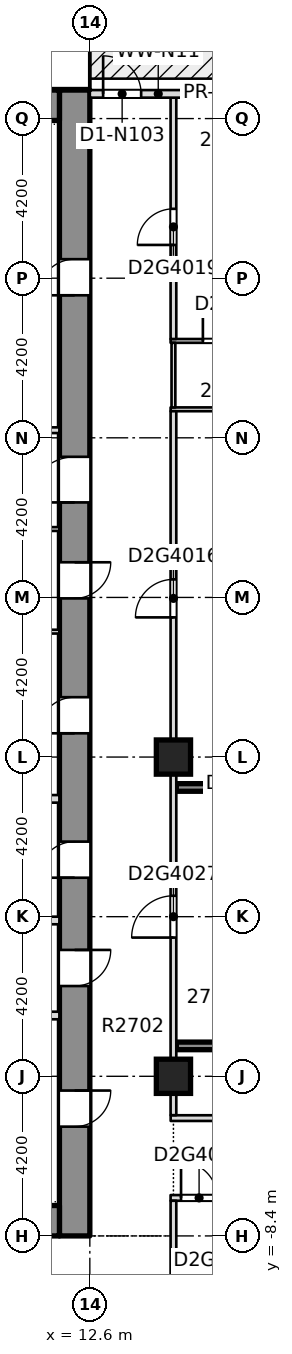
"""IFC4 building model, lengths in metres.
Left out: names, types, materials, properties, quantities, classifications, styles, units other than length and angle.
Written with IfcOpenShell. Run it as: python <this file> out.ifc"""

import sys

from ifc_helpers import new_model, si_unit, direction, frame, frame_2d, origin, origin_2d, place, context, subcontext, project, spatial, rectangle, extrude, element, fill, save


model = new_model("IFC4")
c1 = context("Model", 3, precision=1e-05, world=origin(), true_north=direction((0.0, 1.0)))
c2 = subcontext(c1, "Body", "Model", "MODEL_VIEW")
j1 = project(units=[si_unit("LENGTHUNIT", "METRE"), si_unit("PLANEANGLEUNIT", "RADIAN")], contexts=[c1])
p1 = place(None, origin())
s1 = spatial("IfcSite", under=j1, at=p1, CompositionType="ELEMENT")
p2 = place(p1, origin())
s2 = spatial("IfcBuilding", under=s1, at=p2, CompositionType="ELEMENT")
p3 = place(p2, frame((0.0, 0.0, 108.0)))
s3 = spatial("IfcBuildingStorey", under=s2, at=p3, CompositionType="ELEMENT", Elevation=108.0)
p4 = place(p3, frame((12.2, -8.4, -0.32), z_axis=(0.0, 0.0, 1.0), x_axis=(0.0, 1.0, 0.0)))
e1 = element("IfcWall", 1, at=p4, inside=s3, PredefinedType="SHEAR", context=c2, shape_type="SweptSolid", body=[
    extrude(rectangle(XDim=30.15, YDim=0.8, at=frame_2d((15.075, 0.0))), origin(), (0.0, 0.0, 1.0), 3.45),
])
p5 = place(p4, frame((2.875, 0.0, 0.32)))
e2 = element("IfcOpeningElement", 2, at=p5, cuts=e1, PredefinedType="OPENING", context=c2, shape_type="SweptSolid", body=[
    extrude(rectangle(XDim=0.95, YDim=2.1, at=frame_2d((0.475, 1.05))), frame((0.0, 0.41, 0.0), z_axis=(0.0, -1.0, 0.0), x_axis=(1.0, 0.0, 0.0)), (0.0, 0.0, 1.0), 0.82),
])
p6 = place(p4, frame((6.575, 0.0, 0.32)))
e3 = element("IfcOpeningElement", 3, at=p6, cuts=e1, PredefinedType="OPENING", context=c2, shape_type="SweptSolid", body=[
    extrude(rectangle(XDim=0.95, YDim=2.1, at=frame_2d((0.475, 1.05))), frame((0.0, 0.41, 0.0), z_axis=(0.0, -1.0, 0.0), x_axis=(1.0, 0.0, 0.0)), (0.0, 0.0, 1.0), 0.82),
])
p7 = place(p4, frame((9.425, 0.0, 0.32)))
e4 = element("IfcOpeningElement", 4, at=p7, cuts=e1, PredefinedType="OPENING", context=c2, shape_type="SweptSolid", body=[
    extrude(rectangle(XDim=0.95, YDim=2.1, at=frame_2d((0.475, 1.05))), frame((0.0, 0.41, 0.0), z_axis=(0.0, -1.0, 0.0), x_axis=(1.0, 0.0, 0.0)), (0.0, 0.0, 1.0), 0.82),
])
p8 = place(p4, frame((13.225, 0.0, 0.32)))
e5 = element("IfcOpeningElement", 5, at=p8, cuts=e1, PredefinedType="OPENING", context=c2, shape_type="SweptSolid", body=[
    extrude(rectangle(XDim=0.95, YDim=2.1, at=frame_2d((0.475, 1.05))), frame((0.0, 0.41, 0.0), z_axis=(0.0, -1.0, 0.0), x_axis=(1.0, 0.0, 0.0)), (0.0, 0.0, 1.0), 0.82),
])
p9 = place(p4, frame((16.775, 0.0, 0.32)))
e6 = element("IfcOpeningElement", 6, at=p9, cuts=e1, PredefinedType="OPENING", context=c2, shape_type="SweptSolid", body=[
    extrude(rectangle(XDim=0.95, YDim=2.1, at=frame_2d((0.475, 1.05))), frame((0.0, 0.41, 0.0), z_axis=(0.0, -1.0, 0.0), x_axis=(1.0, 0.0, 0.0)), (0.0, 0.0, 1.0), 0.82),
])
p10 = place(p4, frame((24.75, 0.0, 0.32)))
e7 = element("IfcOpeningElement", 7, at=p10, cuts=e1, PredefinedType="OPENING", context=c2, shape_type="SweptSolid", body=[
    extrude(rectangle(XDim=0.95, YDim=2.1, at=frame_2d((0.475, 1.05))), frame((0.0, 0.41, 0.0), z_axis=(0.0, -1.0, 0.0), x_axis=(1.0, 0.0, 0.0)), (0.0, 0.0, 1.0), 0.82),
])
p11 = place(p4, frame((19.3, 0.0, 0.32)))
e8 = element("IfcOpeningElement", 8, at=p11, cuts=e1, PredefinedType="OPENING", context=c2, shape_type="SweptSolid", body=[
    extrude(rectangle(XDim=1.2, YDim=2.1, at=frame_2d((0.6, 1.05))), frame((0.0, 0.41, 0.0), z_axis=(0.0, -1.0, 0.0), x_axis=(1.0, 0.0, 0.0)), (0.0, 0.0, 1.0), 0.82),
])
p12 = place(p3, frame((-11.8, -8.0, -0.32), z_axis=(0.0, 0.0, 1.0), x_axis=(1.0, 0.0, 0.0)))
e9 = element("IfcWall", 9, at=p12, inside=s3, PredefinedType="SHEAR", context=c2, shape_type="SweptSolid", body=[
    extrude(rectangle(XDim=23.6, YDim=0.8, at=frame_2d((11.8, 0.0))), origin(), (0.0, 0.0, 1.0), 3.45),
])
p13 = place(p12, frame((7.05, 0.0, 0.32)))
e10 = element("IfcOpeningElement", 10, at=p13, cuts=e9, PredefinedType="OPENING", context=c2, shape_type="SweptSolid", body=[
    extrude(rectangle(XDim=1.8, YDim=2.1, at=frame_2d((0.9, 1.05))), frame((0.0, 0.41, 0.0), z_axis=(0.0, -1.0, 0.0), x_axis=(1.0, 0.0, 0.0)), (0.0, 0.0, 1.0), 0.82),
])
p14 = place(p12, frame((14.75, 0.0, 0.32)))
e11 = element("IfcOpeningElement", 11, at=p14, cuts=e9, PredefinedType="OPENING", context=c2, shape_type="SweptSolid", body=[
    extrude(rectangle(XDim=1.8, YDim=2.1, at=frame_2d((0.9, 1.05))), frame((0.0, 0.41, 0.0), z_axis=(0.0, -1.0, 0.0), x_axis=(1.0, 0.0, 0.0)), (0.0, 0.0, 1.0), 0.82),
])
p15 = place(p3, frame((-11.8, 21.35, -0.32), z_axis=(0.0, 0.0, 1.0), x_axis=(1.0, 0.0, 0.0)))
e12 = element("IfcWall", 12, at=p15, inside=s3, PredefinedType="SHEAR", context=c2, shape_type="SweptSolid", body=[
    extrude(rectangle(XDim=23.6, YDim=0.8, at=frame_2d((11.8, 0.0))), origin(), (0.0, 0.0, 1.0), 3.45),
])
for number, where, z_axis, x_axis in (
    (13, (14.8, -4.2, -0.32), (0.0, 0.0, 1.0), (1.0, 0.0, 0.0)),
    (14, (14.8, 4.2, -0.32), (0.0, 0.0, 1.0), (1.0, 0.0, 0.0)),
):
    element("IfcColumn", number, at=place(p3, frame(where, z_axis=z_axis, x_axis=x_axis)), inside=s3, PredefinedType="COLUMN", context=c2, shape_type="SweptSolid", body=[
        extrude(rectangle(XDim=0.9, YDim=0.9, at=origin_2d()), origin(), (0.0, 0.0, 1.0), 3.45),
    ])
p16 = place(p3, frame((14.725, -7.4, 0.0), z_axis=(0.0, 0.0, 1.0), x_axis=(1.0, 0.0, 0.0)))
e15 = element("IfcWall", 15, at=p16, inside=s3, PredefinedType="PARTITIONING", context=c2, shape_type="SweptSolid", body=[
    extrude(rectangle(XDim=11.025, YDim=0.15, at=frame_2d((5.512, 0.0))), origin(), (0.0, 0.0, 1.0), 3.13),
])
p17 = place(p16, frame((0.275, 0.0, 0.0)))
e16 = element("IfcOpeningElement", 16, at=p17, cuts=e15, PredefinedType="OPENING", context=c2, shape_type="SweptSolid", body=[
    extrude(rectangle(XDim=0.95, YDim=2.1, at=frame_2d((0.475, 1.05))), frame((0.0, 0.085, 0.0), z_axis=(0.0, -1.0, 0.0), x_axis=(1.0, 0.0, 0.0)), (0.0, 0.0, 1.0), 0.17),
])
p18 = place(p3, frame((14.727, -5.3, 0.0), z_axis=(0.0, 0.0, 1.0), x_axis=(1.0, 0.0, 0.0)))
e17 = element("IfcWall", 17, at=p18, inside=s3, PredefinedType="PARTITIONING", context=c2, shape_type="SweptSolid", body=[
    extrude(rectangle(XDim=11.023, YDim=0.15, at=frame_2d((5.511, 0.0))), origin(), (0.0, 0.0, 1.0), 3.13),
])
p19 = place(p3, frame((14.877, -3.4, 0.0), z_axis=(0.0, 0.0, 1.0), x_axis=(1.0, 0.0, 0.0)))
e18 = element("IfcWall", 18, at=p19, inside=s3, PredefinedType="SOLIDWALL", context=c2, shape_type="SweptSolid", body=[
    extrude(rectangle(XDim=5.523, YDim=0.2, at=frame_2d((2.761, 0.0))), origin(), (0.0, 0.0, 1.0), 3.13),
])
p20 = place(p3, frame((14.875, 3.4, 0.0), z_axis=(0.0, 0.0, 1.0), x_axis=(1.0, 0.0, 0.0)))
e19 = element("IfcWall", 19, at=p20, inside=s3, PredefinedType="SOLIDWALL", context=c2, shape_type="SweptSolid", body=[
    extrude(rectangle(XDim=5.575, YDim=0.2, at=frame_2d((2.788, 0.0))), origin(), (0.0, 0.0, 1.0), 3.13),
])
p21 = place(p3, frame((14.725, 13.35, 0.0), z_axis=(0.0, 0.0, 1.0), x_axis=(1.0, 0.0, 0.0)))
e20 = element("IfcWall", 20, at=p21, inside=s3, PredefinedType="PARTITIONING", context=c2, shape_type="SweptSolid", body=[
    extrude(rectangle(XDim=2.525, YDim=0.1, at=frame_2d((1.262, 0.0))), origin(), (0.0, 0.0, 1.0), 3.13),
])
p22 = place(p3, frame((14.725, 15.15, 0.0), z_axis=(0.0, 0.0, 1.0), x_axis=(1.0, 0.0, 0.0)))
e21 = element("IfcWall", 21, at=p22, inside=s3, PredefinedType="PARTITIONING", context=c2, shape_type="SweptSolid", body=[
    extrude(rectangle(XDim=2.525, YDim=0.1, at=frame_2d((1.262, 0.0))), origin(), (0.0, 0.0, 1.0), 3.13),
])
p23 = place(p22, frame((0.85, 0.0, 0.0)))
e22 = element("IfcOpeningElement", 22, at=p23, cuts=e21, PredefinedType="OPENING", context=c2, shape_type="SweptSolid", body=[
    extrude(rectangle(XDim=0.85, YDim=2.1, at=frame_2d((0.425, 1.05))), frame((0.0, 0.06, 0.0), z_axis=(0.0, -1.0, 0.0), x_axis=(1.0, 0.0, 0.0)), (0.0, 0.0, 1.0), 0.12),
])
p24 = place(p3, frame((14.8, -10.11, 0.0), z_axis=(0.0, 0.0, 1.0), x_axis=(0.0, 1.0, 0.0)))
e23 = element("IfcWall", 23, at=p24, inside=s3, PredefinedType="PARTITIONING", context=c2, shape_type="SweptSolid", body=[
    extrude(rectangle(XDim=2.635, YDim=0.15, at=frame_2d((1.317, 0.0))), origin(), (0.0, 0.0, 1.0), 3.13),
])
p25 = place(p3, frame((14.8, -5.223, 0.0), z_axis=(0.0, 0.0, 1.0), x_axis=(0.0, 1.0, 0.0)))
e24 = element("IfcWall", 24, at=p25, inside=s3, PredefinedType="PARTITIONING", context=c2, shape_type="SweptSolid", body=[
    extrude(rectangle(XDim=18.523, YDim=0.15, at=frame_2d((9.261, 0.0))), origin(), (0.0, 0.0, 1.0), 3.13),
])
p26 = place(p25, frame((13.098, 0.0, 0.0)))
e25 = element("IfcOpeningElement", 25, at=p26, cuts=e24, PredefinedType="OPENING", context=c2, shape_type="SweptSolid", body=[
    extrude(rectangle(XDim=1.0, YDim=2.1, at=frame_2d((0.5, 1.05))), frame((0.0, 0.085, 0.0), z_axis=(0.0, -1.0, 0.0), x_axis=(1.0, 0.0, 0.0)), (0.0, 0.0, 1.0), 0.17),
])
p27 = place(p25, frame((4.673, 0.0, 0.0)))
e26 = element("IfcOpeningElement", 26, at=p27, cuts=e24, PredefinedType="OPENING", context=c2, shape_type="SweptSolid", body=[
    extrude(rectangle(XDim=1.1, YDim=2.1, at=frame_2d((0.55, 1.05))), frame((0.0, 0.085, 0.0), z_axis=(0.0, -1.0, 0.0), x_axis=(1.0, 0.0, 0.0)), (0.0, 0.0, 1.0), 0.17),
])
p28 = place(p3, frame((14.8, 13.4, 0.0), z_axis=(0.0, 0.0, 1.0), x_axis=(0.0, 1.0, 0.0)))
e27 = element("IfcWall", 27, at=p28, inside=s3, PredefinedType="PARTITIONING", context=c2, shape_type="SweptSolid", body=[
    extrude(rectangle(XDim=1.7, YDim=0.1, at=frame_2d((0.85, 0.0))), origin(), (0.0, 0.0, 1.0), 3.13),
])
p29 = place(p3, frame((14.8, 15.2, 0.0), z_axis=(0.0, 0.0, 1.0), x_axis=(0.0, 1.0, 0.0)))
e28 = element("IfcWall", 28, at=p29, inside=s3, PredefinedType="PARTITIONING", context=c2, shape_type="SweptSolid", body=[
    extrude(rectangle(XDim=6.35, YDim=0.15, at=frame_2d((3.175, 0.0))), origin(), (0.0, 0.0, 1.0), 3.13),
])
p30 = place(p29, frame((2.475, 0.0, 0.0)))
e29 = element("IfcOpeningElement", 29, at=p30, cuts=e28, PredefinedType="OPENING", context=c2, shape_type="SweptSolid", body=[
    extrude(rectangle(XDim=0.95, YDim=2.1, at=frame_2d((0.475, 1.05))), frame((0.0, 0.085, 0.0), z_axis=(0.0, -1.0, 0.0), x_axis=(1.0, 0.0, 0.0)), (0.0, 0.0, 1.0), 0.17),
])
p31 = place(p3, frame((16.2, 21.65, 0.0), z_axis=(0.0, 0.0, 1.0), x_axis=(-1.0, 0.0, 0.0)))
e30 = element("IfcWall", 30, at=p31, inside=s3, PredefinedType="STANDARD", context=c2, shape_type="SweptSolid", body=[
    extrude(rectangle(XDim=3.6, YDim=0.2, at=frame_2d((1.8, 0.0))), origin(), (0.0, 0.0, 1.0), 3.13),
])
p32 = place(p31, frame((2.25, 0.0, 0.0)))
e31 = element("IfcOpeningElement", 31, at=p32, cuts=e30, PredefinedType="OPENING", context=c2, shape_type="SweptSolid", body=[
    extrude(rectangle(XDim=1.0, YDim=2.4, at=frame_2d((0.5, 1.2))), frame((0.0, 0.11, 0.0), z_axis=(0.0, -1.0, 0.0), x_axis=(1.0, 0.0, 0.0)), (0.0, 0.0, 1.0), 0.22),
])
for number, where, z_axis, x_axis in (
    (32, (8.801, -2.6, 0.0), (0.0, 0.0, 1.0), (1.0, 0.0, 0.0)),
    (33, (8.801, -0.1, 0.0), (0.0, 0.0, 1.0), (1.0, 0.0, 0.0)),
    (34, (8.801, 3.1, 0.0), (0.0, 0.0, 1.0), (1.0, 0.0, 0.0)),
):
    element("IfcWall", number, at=place(p3, frame(where, z_axis=z_axis, x_axis=x_axis)), inside=s3, PredefinedType="PARTITIONING", context=c2, shape_type="SweptSolid", body=[
        extrude(rectangle(XDim=2.998, YDim=0.2, at=frame_2d((1.499, 0.0))), origin(), (0.0, 0.0, 1.0), 3.13),
    ])
for number, where, z_axis, x_axis in (
    (35, (8.801, 7.5, 0.0), (0.0, 0.0, 1.0), (1.0, 0.0, 0.0)),
    (36, (8.801, 10.2, 0.0), (0.0, 0.0, 1.0), (1.0, 0.0, 0.0)),
):
    element("IfcWall", number, at=place(p3, frame(where, z_axis=z_axis, x_axis=x_axis)), inside=s3, PredefinedType="PARTITIONING", context=c2, shape_type="SweptSolid", body=[
        extrude(rectangle(XDim=2.998, YDim=0.1, at=frame_2d((1.499, 0.0))), origin(), (0.0, 0.0, 1.0), 3.13),
    ])
p33 = place(p3, frame((8.801, 12.8, 0.0), z_axis=(0.0, 0.0, 1.0), x_axis=(1.0, 0.0, 0.0)))
e37 = element("IfcWall", 37, at=p33, inside=s3, PredefinedType="PARTITIONING", context=c2, shape_type="SweptSolid", body=[
    extrude(rectangle(XDim=2.998, YDim=0.15, at=frame_2d((1.499, 0.0))), origin(), (0.0, 0.0, 1.0), 3.13),
])
p34 = place(p17, origin())
e38 = element("IfcDoor", 38, at=p34, inside=s3, OperationType="SINGLE_SWING_RIGHT", PredefinedType="DOOR", context=c2, shape_type="SweptSolid", body=[
    extrude(rectangle(XDim=0.95, YDim=2.1, at=frame_2d((0.475, 1.05))), frame((0.0, 0.025, 0.0), z_axis=(0.0, -1.0, 0.0), x_axis=(1.0, 0.0, 0.0)), (0.0, 0.0, 1.0), 0.05),
])
fill(e16, e38)
p35 = place(p26, origin())
e39 = element("IfcDoor", 39, at=p35, inside=s3, OperationType="SINGLE_SWING_RIGHT", PredefinedType="DOOR", context=c2, shape_type="SweptSolid", body=[
    extrude(rectangle(XDim=1.0, YDim=2.1, at=frame_2d((0.5, 1.05))), frame((0.0, 0.025, 0.0), z_axis=(0.0, -1.0, 0.0), x_axis=(1.0, 0.0, 0.0)), (0.0, 0.0, 1.0), 0.05),
])
fill(e25, e39)
p36 = place(p30, origin())
e40 = element("IfcDoor", 40, at=p36, inside=s3, OperationType="SINGLE_SWING_LEFT", PredefinedType="DOOR", context=c2, shape_type="SweptSolid", body=[
    extrude(rectangle(XDim=0.95, YDim=2.1, at=frame_2d((0.475, 1.05))), frame((0.0, 0.025, 0.0), z_axis=(0.0, -1.0, 0.0), x_axis=(1.0, 0.0, 0.0)), (0.0, 0.0, 1.0), 0.05),
])
fill(e29, e40)
p37 = place(p23, origin())
e41 = element("IfcDoor", 41, at=p37, inside=s3, OperationType="SINGLE_SWING_RIGHT", PredefinedType="DOOR", context=c2, shape_type="SweptSolid", body=[
    extrude(rectangle(XDim=0.85, YDim=2.1, at=frame_2d((0.425, 1.05))), frame((0.0, 0.025, 0.0), z_axis=(0.0, -1.0, 0.0), x_axis=(1.0, 0.0, 0.0)), (0.0, 0.0, 1.0), 0.05),
])
fill(e22, e41)
p38 = place(p27, origin())
e42 = element("IfcDoor", 42, at=p38, inside=s3, OperationType="SINGLE_SWING_RIGHT", PredefinedType="DOOR", context=c2, shape_type="SweptSolid", body=[
    extrude(rectangle(XDim=1.1, YDim=2.1, at=frame_2d((0.55, 1.05))), frame((0.0, 0.025, 0.0), z_axis=(0.0, -1.0, 0.0), x_axis=(1.0, 0.0, 0.0)), (0.0, 0.0, 1.0), 0.05),
])
fill(e26, e42)
p39 = place(p32, origin())
e43 = element("IfcDoor", 43, at=p39, inside=s3, OperationType="SINGLE_SWING_LEFT", PredefinedType="DOOR", context=c2, shape_type="SweptSolid", body=[
    extrude(rectangle(XDim=1.0, YDim=2.4, at=frame_2d((0.5, 1.2))), frame((0.0, 0.025, 0.0), z_axis=(0.0, -1.0, 0.0), x_axis=(1.0, 0.0, 0.0)), (0.0, 0.0, 1.0), 0.05),
])
fill(e31, e43)
p40 = place(p5, origin())
e44 = element("IfcDoor", 44, at=p40, inside=s3, OperationType="SINGLE_SWING_LEFT", PredefinedType="DOOR", context=c2, shape_type="SweptSolid", body=[
    extrude(rectangle(XDim=0.95, YDim=2.1, at=frame_2d((0.475, 1.05))), frame((0.0, 0.025, 0.0), z_axis=(0.0, -1.0, 0.0), x_axis=(1.0, 0.0, 0.0)), (0.0, 0.0, 1.0), 0.05),
])
fill(e2, e44)
p41 = place(p6, origin())
e45 = element("IfcDoor", 45, at=p41, inside=s3, OperationType="SINGLE_SWING_LEFT", PredefinedType="DOOR", context=c2, shape_type="SweptSolid", body=[
    extrude(rectangle(XDim=0.95, YDim=2.1, at=frame_2d((0.475, 1.05))), frame((0.0, 0.025, 0.0), z_axis=(0.0, -1.0, 0.0), x_axis=(1.0, 0.0, 0.0)), (0.0, 0.0, 1.0), 0.05),
])
fill(e3, e45)
p42 = place(p7, origin())
e46 = element("IfcDoor", 46, at=p42, inside=s3, OperationType="SINGLE_SWING_LEFT", PredefinedType="DOOR", context=c2, shape_type="SweptSolid", body=[
    extrude(rectangle(XDim=0.95, YDim=2.1, at=frame_2d((0.475, 1.05))), frame((0.0, 0.025, 0.0), z_axis=(0.0, -1.0, 0.0), x_axis=(1.0, 0.0, 0.0)), (0.0, 0.0, 1.0), 0.05),
])
fill(e4, e46)
p43 = place(p8, origin())
e47 = element("IfcDoor", 47, at=p43, inside=s3, OperationType="SINGLE_SWING_LEFT", PredefinedType="DOOR", context=c2, shape_type="SweptSolid", body=[
    extrude(rectangle(XDim=0.95, YDim=2.1, at=frame_2d((0.475, 1.05))), frame((0.0, 0.025, 0.0), z_axis=(0.0, -1.0, 0.0), x_axis=(1.0, 0.0, 0.0)), (0.0, 0.0, 1.0), 0.05),
])
fill(e5, e47)
p44 = place(p9, origin())
e48 = element("IfcDoor", 48, at=p44, inside=s3, OperationType="SINGLE_SWING_LEFT", PredefinedType="DOOR", context=c2, shape_type="SweptSolid", body=[
    extrude(rectangle(XDim=0.95, YDim=2.1, at=frame_2d((0.475, 1.05))), frame((0.0, 0.025, 0.0), z_axis=(0.0, -1.0, 0.0), x_axis=(1.0, 0.0, 0.0)), (0.0, 0.0, 1.0), 0.05),
])
fill(e6, e48)
p45 = place(p10, origin())
e49 = element("IfcDoor", 49, at=p45, inside=s3, OperationType="SINGLE_SWING_LEFT", PredefinedType="DOOR", context=c2, shape_type="SweptSolid", body=[
    extrude(rectangle(XDim=0.95, YDim=2.1, at=frame_2d((0.475, 1.05))), frame((0.0, 0.025, 0.0), z_axis=(0.0, -1.0, 0.0), x_axis=(1.0, 0.0, 0.0)), (0.0, 0.0, 1.0), 0.05),
])
fill(e7, e49)
p46 = place(p11, origin())
e50 = element("IfcDoor", 50, at=p46, inside=s3, OperationType="SINGLE_SWING_LEFT", PredefinedType="DOOR", context=c2, shape_type="SweptSolid", body=[
    extrude(rectangle(XDim=1.2, YDim=2.1, at=frame_2d((0.6, 1.05))), frame((0.0, 0.025, 0.0), z_axis=(0.0, -1.0, 0.0), x_axis=(1.0, 0.0, 0.0)), (0.0, 0.0, 1.0), 0.05),
])
fill(e8, e50)
save(model, sys.argv[1])
